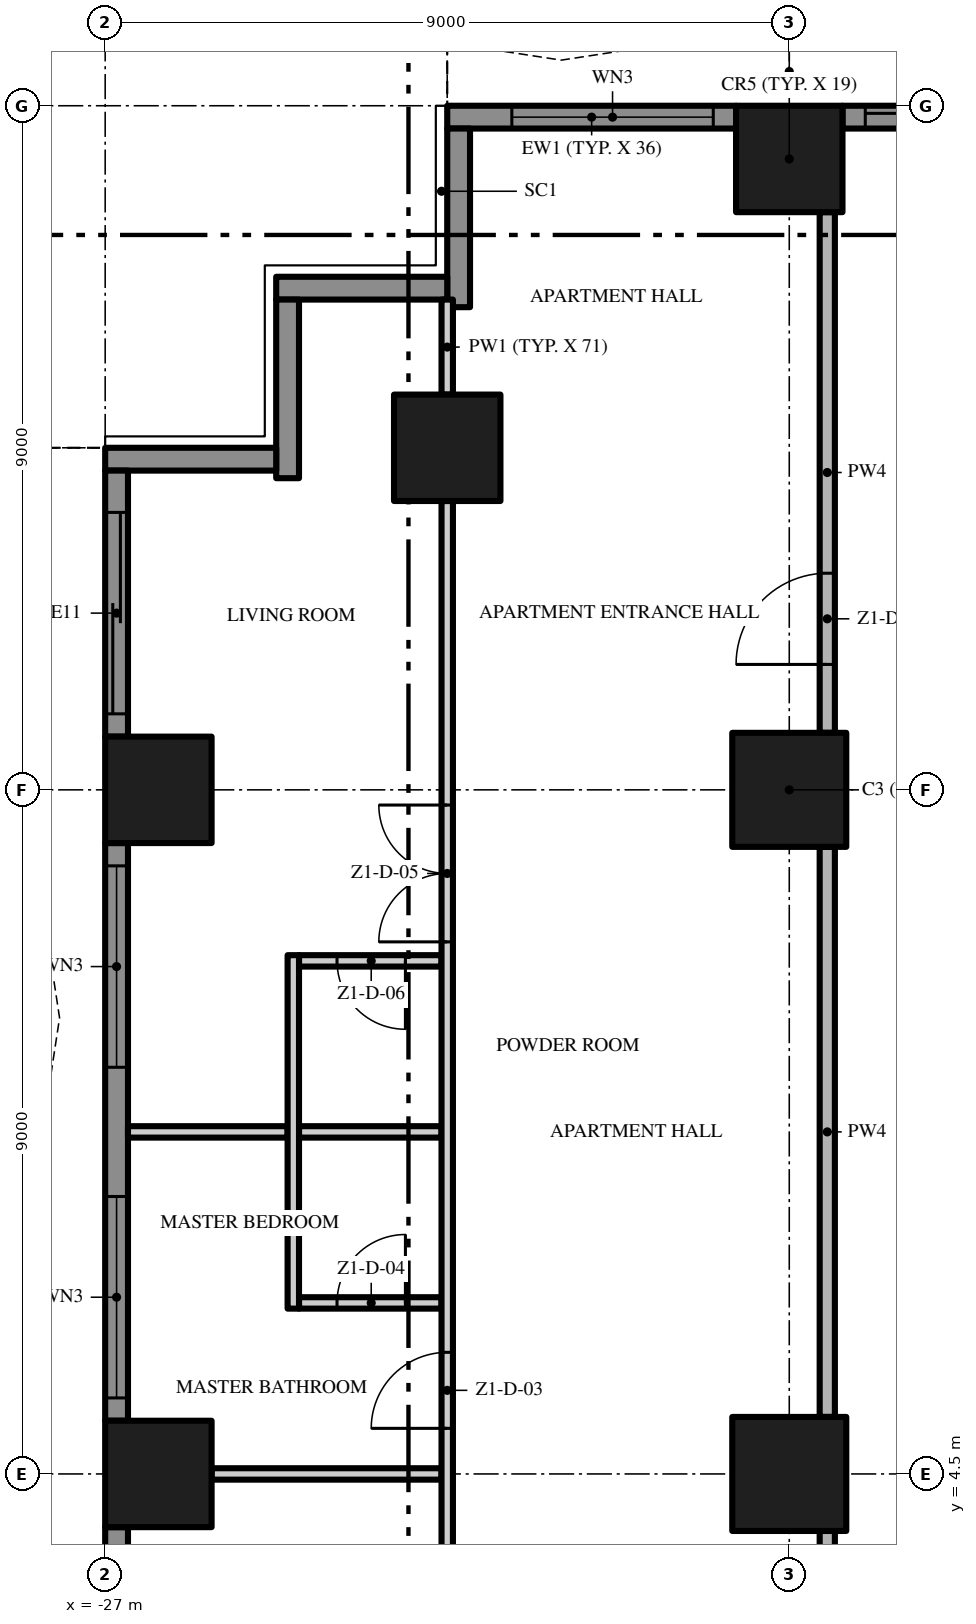
"""IFC4 building model, lengths in metres.
Left out: names, types, materials, properties, quantities, classifications, styles, units other than length and angle.
Written with IfcOpenShell. Run it as: python <this file> out.ifc"""

import sys

from ifc_helpers import new_model, si_unit, direction, frame, frame_2d, origin, origin_2d, place, context, subcontext, project, spatial, polyline, rectangle, outline, extrude, element, fill, save


model = new_model("IFC4")
c1 = context("Model", 3, precision=1e-05, world=origin(), true_north=direction((0.0, 1.0)))
c2 = subcontext(c1, "Body", "Model", "MODEL_VIEW")
j1 = project(units=[si_unit("LENGTHUNIT", "METRE"), si_unit("PLANEANGLEUNIT", "RADIAN")], contexts=[c1])
p1 = place(None, origin())
s1 = spatial("IfcSite", under=j1, at=p1, CompositionType="ELEMENT")
p2 = place(p1, origin())
s2 = spatial("IfcBuilding", under=s1, at=p2, CompositionType="ELEMENT")
p3 = place(p2, frame((0.0, 0.0, 53.0)))
s3 = spatial("IfcBuildingStorey", under=s2, at=p3, CompositionType="ELEMENT", Elevation=53.0)
p4 = place(p3, frame((-18.0, 13.5, 0.0), z_axis=(0.0, 0.0, 1.0), x_axis=(1.0, 0.0, 0.0)))
e1 = element("IfcColumn", 1, at=p4, inside=s3, PredefinedType="COLUMN", context=c2, shape_type="SweptSolid", body=[
    extrude(rectangle(XDim=1.5, YDim=1.5, at=origin_2d()), origin(), (0.0, 0.0, 1.0), 3.5),
])
p5 = place(p3, frame((-18.0, 21.8, 0.0), z_axis=(0.0, 0.0, 1.0), x_axis=(1.0, 0.0, 0.0)))
e2 = element("IfcColumn", 2, at=p5, inside=s3, PredefinedType="COLUMN", context=c2, shape_type="SweptSolid", body=[
    extrude(rectangle(XDim=1.4, YDim=1.4, at=origin_2d()), origin(), (0.0, 0.0, 1.0), 3.5),
])
p6 = place(p3, frame((-18.0, 4.5, 0.0), z_axis=(0.0, 0.0, 1.0), x_axis=(1.0, 0.0, 0.0)))
e3 = element("IfcColumn", 3, at=p6, inside=s3, PredefinedType="COLUMN", context=c2, shape_type="SweptSolid", body=[
    extrude(rectangle(XDim=1.5, YDim=1.5, at=origin_2d()), origin(), (0.0, 0.0, 1.0), 3.5),
])
for number, where, z_axis, x_axis in (
    (4, (-26.3, 13.5, 0.0), (0.0, 0.0, 1.0), (1.0, 0.0, 0.0)),
    (5, (-22.5, 18.0, 0.0), (0.0, 0.0, 1.0), (1.0, 0.0, 0.0)),
    (6, (-26.3, 4.5, 0.0), (0.0, 0.0, 1.0), (1.0, 0.0, 0.0)),
):
    element("IfcColumn", number, at=place(p3, frame(where, z_axis=z_axis, x_axis=x_axis)), inside=s3, PredefinedType="COLUMN", context=c2, shape_type="SweptSolid", body=[
        extrude(rectangle(XDim=1.4, YDim=1.4, at=origin_2d()), origin(), (0.0, 0.0, 1.0), 3.5),
    ])
p7 = place(p3, frame((-17.3, 22.35, 0.0), z_axis=(0.0, 0.0, 1.0), x_axis=(1.0, 0.0, 0.0)))
e7 = element("IfcWall", 7, at=p7, inside=s3, PredefinedType="SOLIDWALL", context=c2, shape_type="SweptSolid", body=[
    extrude(rectangle(XDim=3.8, YDim=0.3, at=frame_2d((1.9, 0.0))), origin(), (0.0, 0.0, 1.0), 3.5),
])
p8 = place(p7, frame((0.3, 0.0, 0.0)))
e8 = element("IfcOpeningElement", 8, at=p8, cuts=e7, PredefinedType="OPENING", context=c2, shape_type="SweptSolid", body=[
    extrude(rectangle(XDim=2.65, YDim=2.4, at=frame_2d((1.325, 1.2))), frame((0.0, 0.16, 0.0), z_axis=(0.0, -1.0, 0.0), x_axis=(1.0, 0.0, 0.0)), (0.0, 0.0, 1.0), 0.32),
])
p9 = place(p3, frame((-22.5, 22.35, 0.0), z_axis=(0.0, 0.0, 1.0), x_axis=(1.0, 0.0, 0.0)))
e9 = element("IfcWall", 9, at=p9, inside=s3, PredefinedType="SOLIDWALL", context=c2, shape_type="SweptSolid", body=[
    extrude(rectangle(XDim=3.8, YDim=0.3, at=frame_2d((1.9, 0.0))), origin(), (0.0, 0.0, 1.0), 3.5),
])
p10 = place(p9, frame((0.85, 0.0, 0.45)))
e10 = element("IfcOpeningElement", 10, at=p10, cuts=e9, PredefinedType="OPENING", context=c2, shape_type="SweptSolid", body=[
    extrude(rectangle(XDim=2.65, YDim=2.65, at=frame_2d((1.325, 1.325))), frame((0.0, 0.16, 0.0), z_axis=(0.0, -1.0, 0.0), x_axis=(1.0, 0.0, 0.0)), (0.0, 0.0, 1.0), 0.32),
])
p11 = place(p3, frame((-22.35, 19.85, 0.0), z_axis=(0.0, 0.0, 1.0), x_axis=(0.0, 1.0, 0.0)))
e11 = element("IfcWall", 11, at=p11, inside=s3, PredefinedType="SOLIDWALL", context=c2, shape_type="SweptSolid", body=[
    extrude(rectangle(XDim=2.35, YDim=0.3, at=frame_2d((1.175, 0.0))), origin(), (0.0, 0.0, 1.0), 3.5),
])
p12 = place(p3, frame((-24.75, 20.1, 0.0), z_axis=(0.0, 0.0, 1.0), x_axis=(1.0, 0.0, 0.0)))
e12 = element("IfcWall", 12, at=p12, inside=s3, PredefinedType="SOLIDWALL", context=c2, shape_type="SweptSolid", body=[
    extrude(rectangle(XDim=2.25, YDim=0.3, at=frame_2d((1.125, 0.0))), origin(), (0.0, 0.0, 1.0), 3.5),
])
p13 = place(p3, frame((-24.6, 17.6, 0.0), z_axis=(0.0, 0.0, 1.0), x_axis=(0.0, 1.0, 0.0)))
e13 = element("IfcWall", 13, at=p13, inside=s3, PredefinedType="SOLIDWALL", context=c2, shape_type="SweptSolid", body=[
    extrude(rectangle(XDim=2.35, YDim=0.3, at=frame_2d((1.175, 0.0))), origin(), (0.0, 0.0, 1.0), 3.5),
])
p14 = place(p3, frame((-27.0, 17.85, 0.0), z_axis=(0.0, 0.0, 1.0), x_axis=(1.0, 0.0, 0.0)))
e14 = element("IfcWall", 14, at=p14, inside=s3, PredefinedType="SOLIDWALL", context=c2, shape_type="SweptSolid", body=[
    extrude(rectangle(XDim=2.25, YDim=0.3, at=frame_2d((1.125, 0.0))), origin(), (0.0, 0.0, 1.0), 3.5),
])
p15 = place(p3, frame((-26.85, 14.2, 0.0), z_axis=(0.0, 0.0, 1.0), x_axis=(0.0, 1.0, 0.0)))
e15 = element("IfcWall", 15, at=p15, inside=s3, PredefinedType="SOLIDWALL", context=c2, shape_type="SweptSolid", body=[
    extrude(rectangle(XDim=3.5, YDim=0.3, at=frame_2d((1.75, 0.0))), origin(), (0.0, 0.0, 1.0), 3.5),
])
p16 = place(p15, frame((0.3, 0.0, 0.0)))
e16 = element("IfcOpeningElement", 16, at=p16, cuts=e15, PredefinedType="OPENING", context=c2, shape_type="SweptSolid", body=[
    extrude(rectangle(XDim=2.65, YDim=2.4, at=frame_2d((1.325, 1.2))), frame((0.0, 0.16, 0.0), z_axis=(0.0, -1.0, 0.0), x_axis=(1.0, 0.0, 0.0)), (0.0, 0.0, 1.0), 0.32),
])
p17 = place(p3, frame((-26.85, 5.2, 0.0), z_axis=(0.0, 0.0, 1.0), x_axis=(0.0, 1.0, 0.0)))
e17 = element("IfcWall", 17, at=p17, inside=s3, PredefinedType="SOLIDWALL", context=c2, shape_type="SweptSolid", body=[
    extrude(rectangle(XDim=7.6, YDim=0.3, at=frame_2d((3.8, 0.0))), origin(), (0.0, 0.0, 1.0), 3.5),
])
p18 = place(p17, frame((4.65, 0.0, 0.45)))
e18 = element("IfcOpeningElement", 18, at=p18, cuts=e17, PredefinedType="OPENING", context=c2, shape_type="SweptSolid", body=[
    extrude(rectangle(XDim=2.65, YDim=2.65, at=frame_2d((1.325, 1.325))), frame((0.0, 0.16, 0.0), z_axis=(0.0, -1.0, 0.0), x_axis=(1.0, 0.0, 0.0)), (0.0, 0.0, 1.0), 0.32),
])
p19 = place(p17, frame((0.3, 0.0, 0.45)))
e19 = element("IfcOpeningElement", 19, at=p19, cuts=e17, PredefinedType="OPENING", context=c2, shape_type="SweptSolid", body=[
    extrude(rectangle(XDim=2.65, YDim=2.65, at=frame_2d((1.325, 1.325))), frame((0.0, 0.16, 0.0), z_axis=(0.0, -1.0, 0.0), x_axis=(1.0, 0.0, 0.0)), (0.0, 0.0, 1.0), 0.32),
])
p20 = place(p3, frame((-26.85, -3.8, 0.0), z_axis=(0.0, 0.0, 1.0), x_axis=(0.0, 1.0, 0.0)))
e20 = element("IfcWall", 20, at=p20, inside=s3, PredefinedType="SOLIDWALL", context=c2, shape_type="SweptSolid", body=[
    extrude(rectangle(XDim=7.6, YDim=0.3, at=frame_2d((3.8, 0.0))), origin(), (0.0, 0.0, 1.0), 3.5),
])
p21 = place(p20, frame((4.65, 0.0, 0.0)))
e21 = element("IfcOpeningElement", 21, at=p21, cuts=e20, PredefinedType="OPENING", context=c2, shape_type="SweptSolid", body=[
    extrude(rectangle(XDim=2.65, YDim=2.4, at=frame_2d((1.325, 1.2))), frame((0.0, 0.16, 0.0), z_axis=(0.0, -1.0, 0.0), x_axis=(1.0, 0.0, 0.0)), (0.0, 0.0, 1.0), 0.32),
])
p22 = place(p20, frame((0.3, 0.0, 0.45)))
e22 = element("IfcOpeningElement", 22, at=p22, cuts=e20, PredefinedType="OPENING", context=c2, shape_type="SweptSolid", body=[
    extrude(rectangle(XDim=2.65, YDim=2.65, at=frame_2d((1.325, 1.325))), frame((0.0, 0.16, 0.0), z_axis=(0.0, -1.0, 0.0), x_axis=(1.0, 0.0, 0.0)), (0.0, 0.0, 1.0), 0.32),
])
p23 = place(p3, origin())
e23 = element("IfcWall", 23, at=p23, inside=s3, PredefinedType="USERDEFINED", context=c2, shape_type="SweptSolid", body=[
    extrude(outline(polyline([(-13.5, 25.5), (-15.0, 25.271), (-16.5, 24.671), (-18.0, 23.929), (-19.5, 23.329), (-21.0, 23.1), (-22.5, 23.329), (-22.538, 23.082), (-21.0, 22.847), (-19.434, 23.086), (-17.898, 23.701), (-16.398, 24.442), (-14.934, 25.028), (-13.462, 25.253), (-13.5, 25.5)])), origin(), (0.0, 0.0, 1.0), 0.9),
])
p24 = place(p3, origin())
e24 = element("IfcWall", 24, at=p24, inside=s3, PredefinedType="USERDEFINED", context=c2, shape_type="SweptSolid", body=[
    extrude(outline(polyline([(-30.0, 18.0), (-29.771, 16.5), (-29.171, 15.0), (-28.429, 13.5), (-27.829, 12.0), (-27.6, 10.5), (-27.829, 9.0), (-28.429, 7.5), (-29.171, 6.0), (-29.771, 4.5), (-30.0, 3.0), (-29.771, 1.5), (-29.171, 0.0), (-28.429, -1.5), (-27.829, -3.0), (-27.6, -4.5), (-27.829, -6.0), (-28.429, -7.5), (-29.171, -9.0), (-29.771, -10.5), (-30.0, -12.0), (-29.771, -13.5), (-29.171, -15.0), (-28.429, -16.5), (-27.829, -18.0), (-27.597, -17.907), (-28.201, -16.398), (-28.942, -14.898), (-29.528, -13.434), (-29.747, -12.0), (-29.528, -10.566), (-28.942, -9.102), (-28.201, -7.602), (-27.586, -6.066), (-27.347, -4.5), (-27.586, -2.934), (-28.201, -1.398), (-28.942, 0.102), (-29.528, 1.566), (-29.747, 3.0), (-29.528, 4.434), (-28.942, 5.898), (-28.201, 7.398), (-27.586, 8.934), (-27.347, 10.5), (-27.586, 12.066), (-28.201, 13.602), (-28.942, 15.102), (-29.528, 16.566), (-29.753, 18.038), (-30.0, 18.0)])), origin(), (0.0, 0.0, 1.0), 0.9),
])
p25 = place(p3, frame((-25.6, 4.5, 0.0), z_axis=(0.0, 0.0, 1.0), x_axis=(1.0, 0.0, 0.0)))
e25 = element("IfcWall", 25, at=p25, inside=s3, PredefinedType="PARTITIONING", context=c2, shape_type="SweptSolid", body=[
    extrude(rectangle(XDim=3.025, YDim=0.15, at=frame_2d((1.512, 0.0))), origin(), (0.0, 0.0, 1.0), 3.5),
])
p26 = place(p3, frame((-24.45, 6.75, 0.0), z_axis=(0.0, 0.0, 1.0), x_axis=(1.0, 0.0, 0.0)))
e26 = element("IfcWall", 26, at=p26, inside=s3, PredefinedType="PARTITIONING", context=c2, shape_type="SweptSolid", body=[
    extrude(rectangle(XDim=1.875, YDim=0.15, at=frame_2d((0.938, 0.0))), origin(), (0.0, 0.0, 1.0), 3.5),
])
p27 = place(p26, frame((0.5, 0.0, 0.0)))
e27 = element("IfcOpeningElement", 27, at=p27, cuts=e26, PredefinedType="OPENING", context=c2, shape_type="SweptSolid", body=[
    extrude(rectangle(XDim=0.9, YDim=2.1, at=frame_2d((0.45, 1.05))), frame((0.0, 0.085, 0.0), z_axis=(0.0, -1.0, 0.0), x_axis=(1.0, 0.0, 0.0)), (0.0, 0.0, 1.0), 0.17),
])
p28 = place(p3, frame((-26.7, 9.0, 0.0), z_axis=(0.0, 0.0, 1.0), x_axis=(1.0, 0.0, 0.0)))
e28 = element("IfcWall", 28, at=p28, inside=s3, PredefinedType="PARTITIONING", context=c2, shape_type="SweptSolid", body=[
    extrude(rectangle(XDim=2.1, YDim=0.15, at=frame_2d((1.05, 0.0))), origin(), (0.0, 0.0, 1.0), 3.5),
])
p29 = place(p3, frame((-24.45, 9.0, 0.0), z_axis=(0.0, 0.0, 1.0), x_axis=(1.0, 0.0, 0.0)))
e29 = element("IfcWall", 29, at=p29, inside=s3, PredefinedType="PARTITIONING", context=c2, shape_type="SweptSolid", body=[
    extrude(rectangle(XDim=1.875, YDim=0.15, at=frame_2d((0.938, 0.0))), origin(), (0.0, 0.0, 1.0), 3.5),
])
p30 = place(p3, frame((-22.575, 11.25, 0.0), z_axis=(0.0, 0.0, 1.0), x_axis=(-1.0, 0.0, 0.0)))
e30 = element("IfcWall", 30, at=p30, inside=s3, PredefinedType="PARTITIONING", context=c2, shape_type="SweptSolid", body=[
    extrude(rectangle(XDim=1.875, YDim=0.15, at=frame_2d((0.938, 0.0))), origin(), (0.0, 0.0, 1.0), 3.5),
])
p31 = place(p30, frame((0.475, 0.0, 0.0)))
e31 = element("IfcOpeningElement", 31, at=p31, cuts=e30, PredefinedType="OPENING", context=c2, shape_type="SweptSolid", body=[
    extrude(rectangle(XDim=0.9, YDim=2.1, at=frame_2d((0.45, 1.05))), frame((0.0, 0.085, 0.0), z_axis=(0.0, -1.0, 0.0), x_axis=(1.0, 0.0, 0.0)), (0.0, 0.0, 1.0), 0.17),
])
p32 = place(p3, frame((-24.525, 6.675, 0.0), z_axis=(0.0, 0.0, 1.0), x_axis=(0.0, 1.0, 0.0)))
e32 = element("IfcWall", 32, at=p32, inside=s3, PredefinedType="PARTITIONING", context=c2, shape_type="SweptSolid", body=[
    extrude(rectangle(XDim=4.65, YDim=0.15, at=frame_2d((2.325, 0.0))), origin(), (0.0, 0.0, 1.0), 3.5),
])
p33 = place(p3, frame((-22.5, 0.1, 0.0), z_axis=(0.0, 0.0, 1.0), x_axis=(0.0, 1.0, 0.0)))
e33 = element("IfcWall", 33, at=p33, inside=s3, PredefinedType="PARTITIONING", context=c2, shape_type="SweptSolid", body=[
    extrude(rectangle(XDim=17.2, YDim=0.15, at=frame_2d((8.6, 0.0))), origin(), (0.0, 0.0, 1.0), 3.5),
])
p34 = place(p33, frame((1.65, 0.0, 0.0)))
e34 = element("IfcOpeningElement", 34, at=p34, cuts=e33, PredefinedType="OPENING", context=c2, shape_type="SweptSolid", body=[
    extrude(rectangle(XDim=1.0, YDim=2.4, at=frame_2d((0.5, 1.2))), frame((0.0, 0.085, 0.0), z_axis=(0.0, -1.0, 0.0), x_axis=(1.0, 0.0, 0.0)), (0.0, 0.0, 1.0), 0.17),
])
p35 = place(p33, frame((5.0, 0.0, 0.0)))
e35 = element("IfcOpeningElement", 35, at=p35, cuts=e33, PredefinedType="OPENING", context=c2, shape_type="SweptSolid", body=[
    extrude(rectangle(XDim=1.0, YDim=2.4, at=frame_2d((0.5, 1.2))), frame((0.0, 0.085, 0.0), z_axis=(0.0, -1.0, 0.0), x_axis=(1.0, 0.0, 0.0)), (0.0, 0.0, 1.0), 0.17),
])
p36 = place(p33, frame((11.4, 0.0, 0.0)))
e36 = element("IfcOpeningElement", 36, at=p36, cuts=e33, PredefinedType="OPENING", context=c2, shape_type="SweptSolid", body=[
    extrude(rectangle(XDim=1.8, YDim=2.4, at=frame_2d((0.9, 1.2))), frame((0.0, 0.085, 0.0), z_axis=(0.0, -1.0, 0.0), x_axis=(1.0, 0.0, 0.0)), (0.0, 0.0, 1.0), 0.17),
])
p37 = place(p3, frame((-22.5, 18.7, 0.0), z_axis=(0.0, 0.0, 1.0), x_axis=(0.0, 1.0, 0.0)))
e37 = element("IfcWall", 37, at=p37, inside=s3, PredefinedType="PARTITIONING", context=c2, shape_type="SweptSolid", body=[
    extrude(rectangle(XDim=1.25, YDim=0.15, at=frame_2d((0.625, 0.0))), origin(), (0.0, 0.0, 1.0), 3.5),
])
p38 = place(p3, frame((-17.5, -0.2, 0.0), z_axis=(0.0, 0.0, 1.0), x_axis=(0.0, 1.0, 0.0)))
e38 = element("IfcWall", 38, at=p38, inside=s3, PredefinedType="PARTITIONING", context=c2, shape_type="SweptSolid", body=[
    extrude(rectangle(XDim=3.95, YDim=0.2, at=frame_2d((1.975, 0.0))), origin(), (0.0, 0.0, 1.0), 3.5),
])
p39 = place(p3, frame((-17.5, 5.25, 0.0), z_axis=(0.0, 0.0, 1.0), x_axis=(0.0, 1.0, 0.0)))
e39 = element("IfcWall", 39, at=p39, inside=s3, PredefinedType="PARTITIONING", context=c2, shape_type="SweptSolid", body=[
    extrude(rectangle(XDim=7.5, YDim=0.2, at=frame_2d((3.75, 0.0))), origin(), (0.0, 0.0, 1.0), 3.5),
])
p40 = place(p3, frame((-17.5, 14.25, 0.0), z_axis=(0.0, 0.0, 1.0), x_axis=(0.0, 1.0, 0.0)))
e40 = element("IfcWall", 40, at=p40, inside=s3, PredefinedType="PARTITIONING", context=c2, shape_type="SweptSolid", body=[
    extrude(rectangle(XDim=6.85, YDim=0.2, at=frame_2d((3.425, 0.0))), origin(), (0.0, 0.0, 1.0), 3.5),
])
p41 = place(p40, frame((0.9, 0.0, 0.0)))
e41 = element("IfcOpeningElement", 41, at=p41, cuts=e40, PredefinedType="OPENING", context=c2, shape_type="SweptSolid", body=[
    extrude(rectangle(XDim=1.2, YDim=2.4, at=frame_2d((0.6, 1.2))), frame((0.0, 0.11, 0.0), z_axis=(0.0, -1.0, 0.0), x_axis=(1.0, 0.0, 0.0)), (0.0, 0.0, 1.0), 0.22),
])
p42 = place(p8, origin())
e42 = element("IfcDoor", 42, at=p42, inside=s3, OperationType="SINGLE_SWING_LEFT", PredefinedType="DOOR", context=c2, shape_type="SweptSolid", body=[
    extrude(rectangle(XDim=2.65, YDim=2.4, at=frame_2d((1.325, 1.2))), frame((0.0, 0.025, 0.0), z_axis=(0.0, -1.0, 0.0), x_axis=(1.0, 0.0, 0.0)), (0.0, 0.0, 1.0), 0.05),
])
fill(e8, e42)
p43 = place(p10, origin())
e43 = element("IfcWindow", 43, at=p43, inside=s3, PartitioningType="SINGLE_PANEL", PredefinedType="WINDOW", context=c2, shape_type="SweptSolid", body=[
    extrude(rectangle(XDim=2.65, YDim=2.65, at=frame_2d((1.325, 1.325))), frame((0.0, 0.03, 0.0), z_axis=(0.0, -1.0, 0.0), x_axis=(1.0, 0.0, 0.0)), (0.0, 0.0, 1.0), 0.06),
])
fill(e10, e43)
p44 = place(p16, origin())
e44 = element("IfcDoor", 44, at=p44, inside=s3, OperationType="SINGLE_SWING_LEFT", PredefinedType="DOOR", context=c2, shape_type="SweptSolid", body=[
    extrude(rectangle(XDim=2.65, YDim=2.4, at=frame_2d((1.325, 1.2))), frame((0.0, 0.025, 0.0), z_axis=(0.0, -1.0, 0.0), x_axis=(1.0, 0.0, 0.0)), (0.0, 0.0, 1.0), 0.05),
])
fill(e16, e44)
p45 = place(p18, origin())
e45 = element("IfcWindow", 45, at=p45, inside=s3, PartitioningType="SINGLE_PANEL", PredefinedType="WINDOW", context=c2, shape_type="SweptSolid", body=[
    extrude(rectangle(XDim=2.65, YDim=2.65, at=frame_2d((1.325, 1.325))), frame((0.0, 0.03, 0.0), z_axis=(0.0, -1.0, 0.0), x_axis=(1.0, 0.0, 0.0)), (0.0, 0.0, 1.0), 0.06),
])
fill(e18, e45)
p46 = place(p19, origin())
e46 = element("IfcWindow", 46, at=p46, inside=s3, PartitioningType="SINGLE_PANEL", PredefinedType="WINDOW", context=c2, shape_type="SweptSolid", body=[
    extrude(rectangle(XDim=2.65, YDim=2.65, at=frame_2d((1.325, 1.325))), frame((0.0, 0.03, 0.0), z_axis=(0.0, -1.0, 0.0), x_axis=(1.0, 0.0, 0.0)), (0.0, 0.0, 1.0), 0.06),
])
fill(e19, e46)
p47 = place(p41, origin())
e47 = element("IfcDoor", 47, at=p47, inside=s3, OperationType="SINGLE_SWING_LEFT", PredefinedType="DOOR", context=c2, shape_type="SweptSolid", body=[
    extrude(rectangle(XDim=1.2, YDim=2.4, at=frame_2d((0.6, 1.2))), frame((0.0, 0.025, 0.0), z_axis=(0.0, -1.0, 0.0), x_axis=(1.0, 0.0, 0.0)), (0.0, 0.0, 1.0), 0.05),
])
fill(e41, e47)
p48 = place(p35, origin())
e48 = element("IfcDoor", 48, at=p48, inside=s3, OperationType="SINGLE_SWING_LEFT", PredefinedType="DOOR", context=c2, shape_type="SweptSolid", body=[
    extrude(rectangle(XDim=1.0, YDim=2.4, at=frame_2d((0.5, 1.2))), frame((0.0, 0.025, 0.0), z_axis=(0.0, -1.0, 0.0), x_axis=(1.0, 0.0, 0.0)), (0.0, 0.0, 1.0), 0.05),
])
fill(e35, e48)
p49 = place(p27, origin())
e49 = element("IfcDoor", 49, at=p49, inside=s3, OperationType="SINGLE_SWING_RIGHT", PredefinedType="DOOR", context=c2, shape_type="SweptSolid", body=[
    extrude(rectangle(XDim=0.9, YDim=2.1, at=frame_2d((0.45, 1.05))), frame((0.0, 0.025, 0.0), z_axis=(0.0, -1.0, 0.0), x_axis=(1.0, 0.0, 0.0)), (0.0, 0.0, 1.0), 0.05),
])
fill(e27, e49)
p50 = place(p36, origin())
e50 = element("IfcDoor", 50, at=p50, inside=s3, OperationType="DOUBLE_DOOR_SINGLE_SWING", PredefinedType="DOOR", context=c2, shape_type="SweptSolid", body=[
    extrude(rectangle(XDim=1.8, YDim=2.4, at=frame_2d((0.9, 1.2))), frame((0.0, 0.025, 0.0), z_axis=(0.0, -1.0, 0.0), x_axis=(1.0, 0.0, 0.0)), (0.0, 0.0, 1.0), 0.05),
])
fill(e36, e50)
p51 = place(p31, origin())
e51 = element("IfcDoor", 51, at=p51, inside=s3, OperationType="SINGLE_SWING_LEFT", PredefinedType="DOOR", context=c2, shape_type="SweptSolid", body=[
    extrude(rectangle(XDim=0.9, YDim=2.1, at=frame_2d((0.45, 1.05))), frame((0.0, 0.025, 0.0), z_axis=(0.0, -1.0, 0.0), x_axis=(1.0, 0.0, 0.0)), (0.0, 0.0, 1.0), 0.05),
])
fill(e31, e51)
save(model, sys.argv[1])
